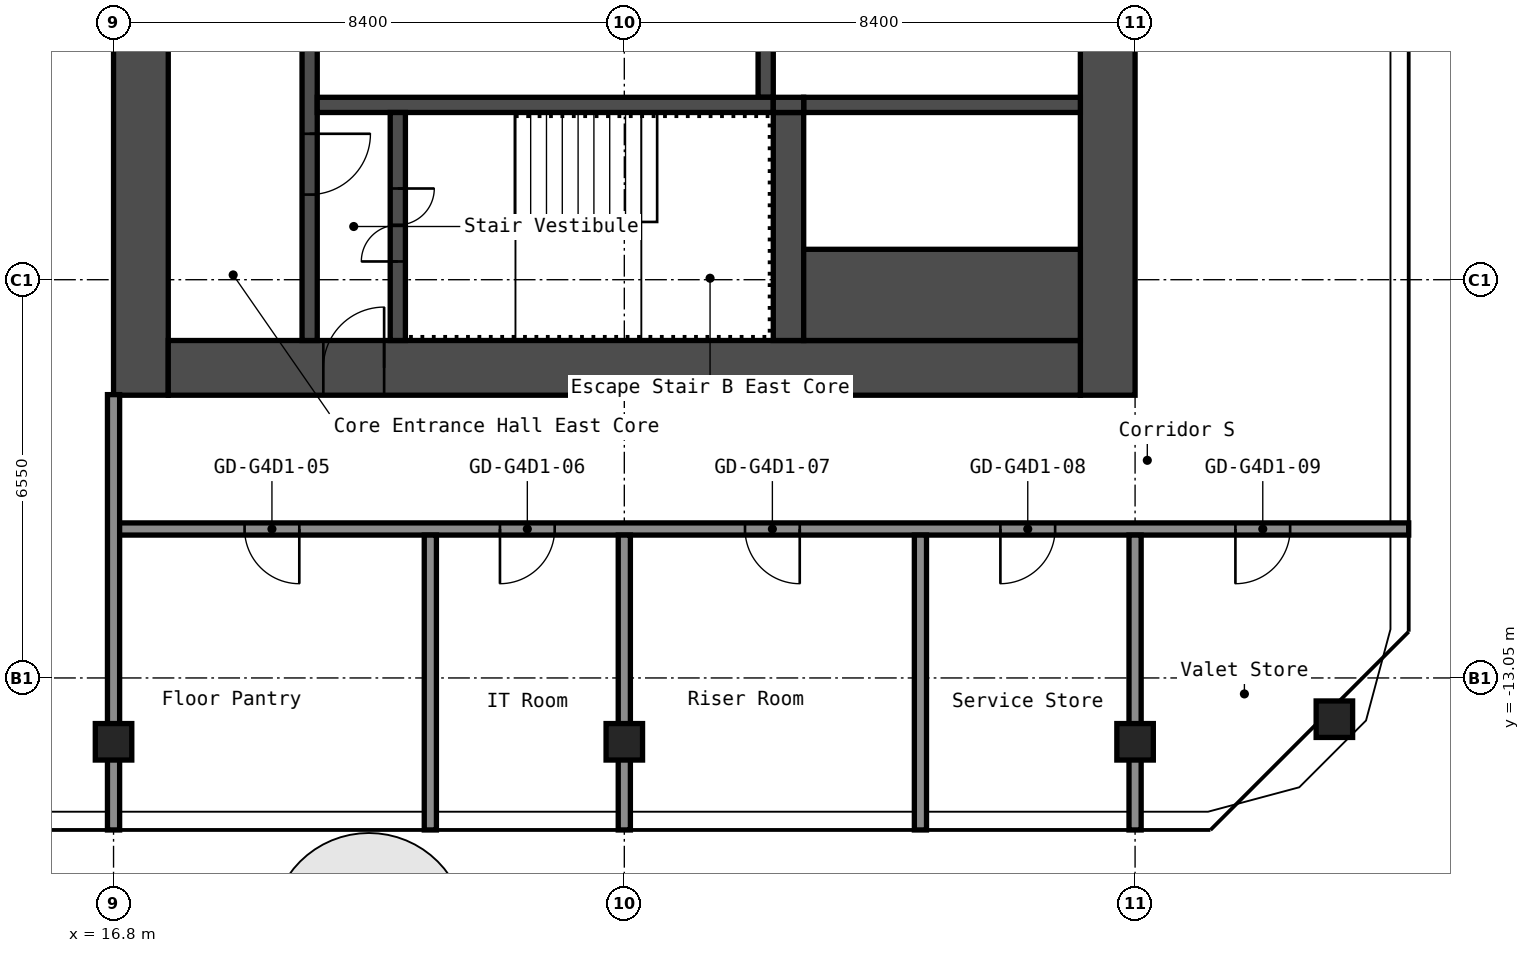
"""IFC4 building model, lengths in metres.
Left out: names, types, materials, properties, quantities, classifications, styles, units other than length and angle.
Written with IfcOpenShell. Run it as: python <this file> out.ifc"""

import sys

from ifc_helpers import new_model, si_unit, direction, frame, frame_2d, origin, origin_2d, place, context, subcontext, project, spatial, rectangle, hollow_rectangle, extrude, element, fill, save


model = new_model("IFC4")
c1 = context("Model", 3, precision=1e-05, world=origin(), true_north=direction((0.0, 1.0)))
c2 = subcontext(c1, "Body", "Model", "MODEL_VIEW")
j1 = project(units=[si_unit("LENGTHUNIT", "METRE"), si_unit("PLANEANGLEUNIT", "RADIAN")], contexts=[c1])
p1 = place(None, origin())
s1 = spatial("IfcSite", under=j1, at=p1, CompositionType="ELEMENT")
p2 = place(p1, origin())
s2 = spatial("IfcBuilding", under=s1, at=p2, CompositionType="ELEMENT")
p3 = place(p2, frame((0.0, 0.0, 212.2)))
s3 = spatial("IfcBuildingStorey", under=s2, at=p3, CompositionType="ELEMENT", Elevation=212.2)
for number, where, z_axis, x_axis in (
    (1, (16.8, -14.1, 0.0), (0.0, 0.0, 1.0), (1.0, 0.0, 0.0)),
    (2, (25.2, -14.1, 0.0), (0.0, 0.0, 1.0), (1.0, 0.0, 0.0)),
    (3, (33.6, -14.1, 0.0), (0.0, 0.0, 1.0), (1.0, 0.0, 0.0)),
    (4, (36.878, -13.729, 0.0), (0.0, 0.0, 1.0), (1.0, 0.0, 0.0)),
):
    element("IfcColumn", number, at=place(p3, frame(where, z_axis=z_axis, x_axis=x_axis)), inside=s3, PredefinedType="COLUMN", context=c2, shape_type="SweptSolid", body=[
        extrude(hollow_rectangle(XDim=0.6, YDim=0.6, WallThickness=0.025, InnerFilletRadius=0.038, OuterFilletRadius=0.062, at=origin_2d()), origin(), (0.0, 0.0, 1.0), 2.75),
    ])
p4 = place(p3, frame((17.25, -8.4, 0.0), z_axis=(0.0, 0.0, 1.0), x_axis=(0.0, 1.0, 0.0)))
e5 = element("IfcWall", 5, at=p4, inside=s3, PredefinedType="SHEAR", context=c2, shape_type="SweptSolid", body=[
    extrude(rectangle(XDim=16.8, YDim=0.9, at=frame_2d((8.4, 0.0))), origin(), (0.0, 0.0, 1.0), 2.75),
])
p5 = place(p4, frame((10.1, 0.0, 0.0)))
e6 = element("IfcOpeningElement", 6, at=p5, cuts=e5, PredefinedType="OPENING", context=c2, shape_type="SweptSolid", body=[
    extrude(rectangle(XDim=1.6, YDim=2.1, at=frame_2d((0.8, 1.05))), frame((0.0, 0.46, 0.0), z_axis=(0.0, -1.0, 0.0), x_axis=(1.0, 0.0, 0.0)), (0.0, 0.0, 1.0), 0.92),
])
p6 = place(p3, frame((33.15, -8.4, 0.0), z_axis=(0.0, 0.0, 1.0), x_axis=(0.0, 1.0, 0.0)))
e7 = element("IfcWall", 7, at=p6, inside=s3, PredefinedType="SHEAR", context=c2, shape_type="SweptSolid", body=[
    extrude(rectangle(XDim=16.8, YDim=0.9, at=frame_2d((8.4, 0.0))), origin(), (0.0, 0.0, 1.0), 2.75),
])
p7 = place(p3, frame((17.7, -7.95, 0.0), z_axis=(0.0, 0.0, 1.0), x_axis=(1.0, 0.0, 0.0)))
e8 = element("IfcWall", 8, at=p7, inside=s3, PredefinedType="SHEAR", context=c2, shape_type="SweptSolid", body=[
    extrude(rectangle(XDim=15.0, YDim=0.9, at=frame_2d((7.5, 0.0))), origin(), (0.0, 0.0, 1.0), 2.75),
])
p8 = place(p7, frame((2.55, 0.0, 0.0)))
e9 = element("IfcOpeningElement", 9, at=p8, cuts=e8, PredefinedType="OPENING", context=c2, shape_type="SweptSolid", body=[
    extrude(rectangle(XDim=1.0, YDim=2.1, at=frame_2d((0.5, 1.05))), frame((0.0, 0.46, 0.0), z_axis=(0.0, -1.0, 0.0), x_axis=(1.0, 0.0, 0.0)), (0.0, 0.0, 1.0), 0.92),
])
p9 = place(p3, frame((20.025, -7.5, 0.0), z_axis=(0.0, 0.0, 1.0), x_axis=(0.0, 1.0, 0.0)))
e10 = element("IfcWall", 10, at=p9, inside=s3, PredefinedType="SHEAR", context=c2, shape_type="SweptSolid", body=[
    extrude(rectangle(XDim=6.3, YDim=0.25, at=frame_2d((3.15, 0.0))), origin(), (0.0, 0.0, 1.0), 2.75),
])
p10 = place(p9, frame((2.4, 0.0, 0.0)))
e11 = element("IfcOpeningElement", 11, at=p10, cuts=e10, PredefinedType="OPENING", context=c2, shape_type="SweptSolid", body=[
    extrude(rectangle(XDim=1.0, YDim=2.1, at=frame_2d((0.5, 1.05))), frame((0.0, 0.135, 0.0), z_axis=(0.0, -1.0, 0.0), x_axis=(1.0, 0.0, 0.0)), (0.0, 0.0, 1.0), 0.27),
])
p11 = place(p3, frame((27.525, -3.5, 0.0), z_axis=(0.0, 0.0, 1.0), x_axis=(0.0, 1.0, 0.0)))
e12 = element("IfcWall", 12, at=p11, inside=s3, PredefinedType="SHEAR", context=c2, shape_type="SweptSolid", body=[
    extrude(rectangle(XDim=2.05, YDim=0.25, at=frame_2d((1.025, 0.0))), origin(), (0.0, 0.0, 1.0), 2.75),
])
p12 = place(p3, frame((20.15, -3.625, 0.0), z_axis=(0.0, 0.0, 1.0), x_axis=(1.0, 0.0, 0.0)))
e13 = element("IfcWall", 13, at=p12, inside=s3, PredefinedType="SHEAR", context=c2, shape_type="SweptSolid", body=[
    extrude(rectangle(XDim=7.5, YDim=0.25, at=frame_2d((3.75, 0.0))), origin(), (0.0, 0.0, 1.0), 2.75),
])
p13 = place(p3, frame((21.475, -7.5, 0.0), z_axis=(0.0, 0.0, 1.0), x_axis=(0.0, 1.0, 0.0)))
e14 = element("IfcWall", 14, at=p13, inside=s3, PredefinedType="SHEAR", context=c2, shape_type="SweptSolid", body=[
    extrude(rectangle(XDim=3.75, YDim=0.25, at=frame_2d((1.875, 0.0))), origin(), (0.0, 0.0, 1.0), 2.75),
])
p14 = place(p13, frame((1.3, 0.0, 0.0)))
e15 = element("IfcOpeningElement", 15, at=p14, cuts=e14, PredefinedType="OPENING", context=c2, shape_type="SweptSolid", body=[
    extrude(rectangle(XDim=1.2, YDim=2.1, at=frame_2d((0.6, 1.05))), frame((0.0, 0.135, 0.0), z_axis=(0.0, -1.0, 0.0), x_axis=(1.0, 0.0, 0.0)), (0.0, 0.0, 1.0), 0.27),
])
p15 = place(p3, frame((27.9, -7.5, 0.0), z_axis=(0.0, 0.0, 1.0), x_axis=(0.0, 1.0, 0.0)))
e16 = element("IfcWall", 16, at=p15, inside=s3, PredefinedType="SHEAR", context=c2, shape_type="SweptSolid", body=[
    extrude(rectangle(XDim=3.75, YDim=0.5, at=frame_2d((1.875, 0.0))), origin(), (0.0, 0.0, 1.0), 2.75),
])
p16 = place(p3, frame((28.15, -3.625, 0.0), z_axis=(0.0, 0.0, 1.0), x_axis=(1.0, 0.0, 0.0)))
e17 = element("IfcWall", 17, at=p16, inside=s3, PredefinedType="SHEAR", context=c2, shape_type="SweptSolid", body=[
    extrude(rectangle(XDim=4.55, YDim=0.25, at=frame_2d((2.275, 0.0))), origin(), (0.0, 0.0, 1.0), 2.75),
])
p17 = place(p3, frame((28.15, -6.75, 0.0), z_axis=(0.0, 0.0, 1.0), x_axis=(1.0, 0.0, 0.0)))
e18 = element("IfcWall", 18, at=p17, inside=s3, PredefinedType="SHEAR", context=c2, shape_type="SweptSolid", body=[
    extrude(rectangle(XDim=4.55, YDim=1.5, at=frame_2d((2.275, 0.0))), origin(), (0.0, 0.0, 1.0), 2.75),
])
p18 = place(p3, frame((27.65, -3.625, 0.0), z_axis=(0.0, 0.0, 1.0), x_axis=(1.0, 0.0, 0.0)))
e19 = element("IfcWall", 19, at=p18, inside=s3, PredefinedType="SHEAR", context=c2, shape_type="SweptSolid", body=[
    extrude(rectangle(XDim=0.5, YDim=0.25, at=frame_2d((0.25, 0.0))), origin(), (0.0, 0.0, 1.0), 2.75),
])
p19 = place(p3, frame((16.8, -10.6, 0.0), z_axis=(0.0, 0.0, 1.0), x_axis=(1.0, 0.0, 0.0)))
e20 = element("IfcWall", 20, at=p19, inside=s3, PredefinedType="PARTITIONING", context=c2, shape_type="SweptSolid", body=[
    extrude(rectangle(XDim=21.3, YDim=0.2, at=frame_2d((10.65, 0.0))), origin(), (0.0, 0.0, 1.0), 2.75),
])
p20 = place(p19, frame((2.155, 0.0, 0.0)))
e21 = element("IfcOpeningElement", 21, at=p20, cuts=e20, PredefinedType="OPENING", context=c2, shape_type="SweptSolid", body=[
    extrude(rectangle(XDim=0.9, YDim=2.1, at=frame_2d((0.45, 1.05))), frame((0.0, 0.11, 0.0), z_axis=(0.0, -1.0, 0.0), x_axis=(1.0, 0.0, 0.0)), (0.0, 0.0, 1.0), 0.22),
])
p21 = place(p19, frame((6.355, 0.0, 0.0)))
e22 = element("IfcOpeningElement", 22, at=p21, cuts=e20, PredefinedType="OPENING", context=c2, shape_type="SweptSolid", body=[
    extrude(rectangle(XDim=0.9, YDim=2.1, at=frame_2d((0.45, 1.05))), frame((0.0, 0.11, 0.0), z_axis=(0.0, -1.0, 0.0), x_axis=(1.0, 0.0, 0.0)), (0.0, 0.0, 1.0), 0.22),
])
p22 = place(p19, frame((10.385, 0.0, 0.0)))
e23 = element("IfcOpeningElement", 23, at=p22, cuts=e20, PredefinedType="OPENING", context=c2, shape_type="SweptSolid", body=[
    extrude(rectangle(XDim=0.9, YDim=2.1, at=frame_2d((0.45, 1.05))), frame((0.0, 0.11, 0.0), z_axis=(0.0, -1.0, 0.0), x_axis=(1.0, 0.0, 0.0)), (0.0, 0.0, 1.0), 0.22),
])
p23 = place(p19, frame((14.585, 0.0, 0.0)))
e24 = element("IfcOpeningElement", 24, at=p23, cuts=e20, PredefinedType="OPENING", context=c2, shape_type="SweptSolid", body=[
    extrude(rectangle(XDim=0.9, YDim=2.1, at=frame_2d((0.45, 1.05))), frame((0.0, 0.11, 0.0), z_axis=(0.0, -1.0, 0.0), x_axis=(1.0, 0.0, 0.0)), (0.0, 0.0, 1.0), 0.22),
])
p24 = place(p19, frame((18.45, 0.0, 0.0)))
e25 = element("IfcOpeningElement", 25, at=p24, cuts=e20, PredefinedType="OPENING", context=c2, shape_type="SweptSolid", body=[
    extrude(rectangle(XDim=0.9, YDim=2.1, at=frame_2d((0.45, 1.05))), frame((0.0, 0.11, 0.0), z_axis=(0.0, -1.0, 0.0), x_axis=(1.0, 0.0, 0.0)), (0.0, 0.0, 1.0), 0.22),
])
p25 = place(p3, frame((16.8, -15.55, 0.0), z_axis=(0.0, 0.0, 1.0), x_axis=(0.0, 1.0, 0.0)))
e26 = element("IfcWall", 26, at=p25, inside=s3, PredefinedType="PARTITIONING", context=c2, shape_type="SweptSolid", body=[
    extrude(rectangle(XDim=7.16, YDim=0.2, at=frame_2d((3.58, 0.0))), origin(), (0.0, 0.0, 1.0), 2.75),
])
for number, where, z_axis, x_axis in (
    (27, (22.01, -15.55, 0.0), (0.0, 0.0, 1.0), (0.0, 1.0, 0.0)),
    (28, (25.2, -15.55, 0.0), (0.0, 0.0, 1.0), (0.0, 1.0, 0.0)),
    (29, (30.07, -15.55, 0.0), (0.0, 0.0, 1.0), (0.0, 1.0, 0.0)),
    (30, (33.6, -15.55, 0.0), (0.0, 0.0, 1.0), (0.0, 1.0, 0.0)),
):
    element("IfcWall", number, at=place(p3, frame(where, z_axis=z_axis, x_axis=x_axis)), inside=s3, PredefinedType="PARTITIONING", context=c2, shape_type="SweptSolid", body=[
        extrude(rectangle(XDim=4.85, YDim=0.2, at=frame_2d((2.425, 0.0))), origin(), (0.0, 0.0, 1.0), 2.75),
    ])
p26 = place(p8, origin())
e31 = element("IfcDoor", 31, at=p26, inside=s3, OperationType="SINGLE_SWING_LEFT", PredefinedType="DOOR", context=c2, shape_type="SweptSolid", body=[
    extrude(rectangle(XDim=1.0, YDim=2.1, at=frame_2d((0.5, 1.05))), frame((0.0, 0.025, 0.0), z_axis=(0.0, -1.0, 0.0), x_axis=(1.0, 0.0, 0.0)), (0.0, 0.0, 1.0), 0.05),
])
fill(e9, e31)
p27 = place(p14, origin())
e32 = element("IfcDoor", 32, at=p27, inside=s3, OperationType="DOUBLE_DOOR_SINGLE_SWING", PredefinedType="DOOR", context=c2, shape_type="SweptSolid", body=[
    extrude(rectangle(XDim=1.2, YDim=2.1, at=frame_2d((0.6, 1.05))), frame((0.0, 0.025, 0.0), z_axis=(0.0, -1.0, 0.0), x_axis=(1.0, 0.0, 0.0)), (0.0, 0.0, 1.0), 0.05),
])
fill(e15, e32)
p28 = place(p10, origin())
e33 = element("IfcDoor", 33, at=p28, inside=s3, OperationType="SINGLE_SWING_RIGHT", PredefinedType="DOOR", context=c2, shape_type="SweptSolid", body=[
    extrude(rectangle(XDim=1.0, YDim=2.1, at=frame_2d((0.5, 1.05))), frame((0.0, 0.025, 0.0), z_axis=(0.0, -1.0, 0.0), x_axis=(1.0, 0.0, 0.0)), (0.0, 0.0, 1.0), 0.05),
])
fill(e11, e33)
p29 = place(p20, origin())
e34 = element("IfcDoor", 34, at=p29, inside=s3, OperationType="SINGLE_SWING_RIGHT", PredefinedType="DOOR", context=c2, shape_type="SweptSolid", body=[
    extrude(rectangle(XDim=0.9, YDim=2.1, at=frame_2d((0.45, 1.05))), frame((0.0, 0.025, 0.0), z_axis=(0.0, -1.0, 0.0), x_axis=(1.0, 0.0, 0.0)), (0.0, 0.0, 1.0), 0.05),
])
fill(e21, e34)
p30 = place(p21, origin())
e35 = element("IfcDoor", 35, at=p30, inside=s3, OperationType="SINGLE_SWING_LEFT", PredefinedType="DOOR", context=c2, shape_type="SweptSolid", body=[
    extrude(rectangle(XDim=0.9, YDim=2.1, at=frame_2d((0.45, 1.05))), frame((0.0, 0.025, 0.0), z_axis=(0.0, -1.0, 0.0), x_axis=(1.0, 0.0, 0.0)), (0.0, 0.0, 1.0), 0.05),
])
fill(e22, e35)
p31 = place(p22, origin())
e36 = element("IfcDoor", 36, at=p31, inside=s3, OperationType="SINGLE_SWING_RIGHT", PredefinedType="DOOR", context=c2, shape_type="SweptSolid", body=[
    extrude(rectangle(XDim=0.9, YDim=2.1, at=frame_2d((0.45, 1.05))), frame((0.0, 0.025, 0.0), z_axis=(0.0, -1.0, 0.0), x_axis=(1.0, 0.0, 0.0)), (0.0, 0.0, 1.0), 0.05),
])
fill(e23, e36)
p32 = place(p23, origin())
e37 = element("IfcDoor", 37, at=p32, inside=s3, OperationType="SINGLE_SWING_LEFT", PredefinedType="DOOR", context=c2, shape_type="SweptSolid", body=[
    extrude(rectangle(XDim=0.9, YDim=2.1, at=frame_2d((0.45, 1.05))), frame((0.0, 0.025, 0.0), z_axis=(0.0, -1.0, 0.0), x_axis=(1.0, 0.0, 0.0)), (0.0, 0.0, 1.0), 0.05),
])
fill(e24, e37)
p33 = place(p24, origin())
e38 = element("IfcDoor", 38, at=p33, inside=s3, OperationType="SINGLE_SWING_LEFT", PredefinedType="DOOR", context=c2, shape_type="SweptSolid", body=[
    extrude(rectangle(XDim=0.9, YDim=2.1, at=frame_2d((0.45, 1.05))), frame((0.0, 0.025, 0.0), z_axis=(0.0, -1.0, 0.0), x_axis=(1.0, 0.0, 0.0)), (0.0, 0.0, 1.0), 0.05),
])
fill(e25, e38)
save(model, sys.argv[1])
